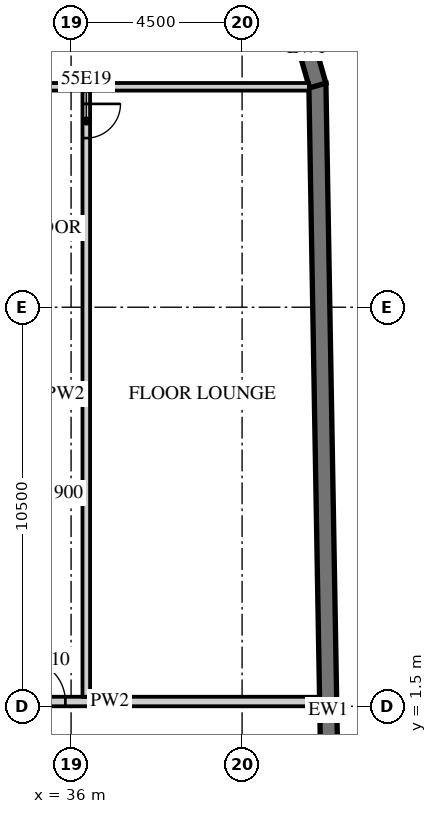
"""IFC4 building model, lengths in metres.
Left out: names, types, materials, properties, quantities, classifications, styles, units other than length and angle.
Written with IfcOpenShell. Run it as: python <this file> out.ifc"""

import sys

from ifc_helpers import new_model, si_unit, direction, frame, frame_2d, origin, place, context, subcontext, project, spatial, polyline, rectangle, outline, extrude, element, fill, save


model = new_model("IFC4")
c1 = context("Model", 3, precision=1e-05, world=origin(), true_north=direction((0.0, 1.0)))
c2 = subcontext(c1, "Body", "Model", "MODEL_VIEW")
j1 = project(units=[si_unit("LENGTHUNIT", "METRE"), si_unit("PLANEANGLEUNIT", "RADIAN")], contexts=[c1])
p1 = place(None, origin())
s1 = spatial("IfcSite", under=j1, at=p1, CompositionType="ELEMENT")
p2 = place(p1, origin())
s2 = spatial("IfcBuilding", under=s1, at=p2, CompositionType="ELEMENT")
p3 = place(p2, frame((0.0, 0.0, 227.6)))
s3 = spatial("IfcBuildingStorey", under=s2, at=p3, CompositionType="ELEMENT", Elevation=227.6)
p4 = place(p3, frame((43.057, -15.103, 0.0), z_axis=(0.0, 0.0, 1.0), x_axis=(-0.017452408953, 0.999847695112, 0.0)))
e1 = element("IfcWall", 1, at=p4, inside=s3, PredefinedType="SOLIDWALL", context=c2, shape_type="SweptSolid", body=[
    extrude(rectangle(XDim=33.0, YDim=0.45, at=frame_2d((16.5, 0.0))), origin(), (0.0, 0.0, 1.0), 3.02),
])
p5 = place(p3, frame((42.49, 17.833, 0.0), z_axis=(0.0, 0.0, 1.0), x_axis=(-0.275546368831, 0.961287781377, 0.0)))
e2 = element("IfcWall", 2, at=p5, inside=s3, PredefinedType="SOLIDWALL", context=c2, shape_type="SweptSolid", body=[
    extrude(outline(polyline([(0.0, -0.225), (2.071, -0.225), (1.95, 0.225), (0.121, 0.225), (0.0, -0.225)])), origin(), (0.0, 0.0, 1.0), 3.02),
])
p6 = place(p3, frame((31.5, 1.625, 0.0), z_axis=(0.0, 0.0, 1.0), x_axis=(1.0, 0.0, 0.0)))
e3 = element("IfcWall", 3, at=p6, inside=s3, PredefinedType="PARTITIONING", context=c2, shape_type="SweptSolid", body=[
    extrude(rectangle(XDim=11.04, YDim=0.25, at=frame_2d((5.52, 0.0))), origin(), (0.0, 0.0, 1.0), 3.02),
])
p7 = place(p6, frame((0.625, 0.0, 0.0)))
e4 = element("IfcOpeningElement", 4, at=p7, cuts=e3, PredefinedType="OPENING", context=c2, shape_type="SweptSolid", body=[
    extrude(rectangle(XDim=1.3, YDim=2.1, at=frame_2d((0.65, 1.05))), frame((0.0, 0.135, 0.0), z_axis=(0.0, -1.0, 0.0), x_axis=(1.0, 0.0, 0.0)), (0.0, 0.0, 1.0), 0.27),
])
p8 = place(p6, frame((3.25, 0.0, 0.0)))
e5 = element("IfcOpeningElement", 5, at=p8, cuts=e3, PredefinedType="OPENING", context=c2, shape_type="SweptSolid", body=[
    extrude(rectangle(XDim=1.1, YDim=2.1, at=frame_2d((0.55, 1.05))), frame((0.0, 0.135, 0.0), z_axis=(0.0, -1.0, 0.0), x_axis=(1.0, 0.0, 0.0)), (0.0, 0.0, 1.0), 0.27),
])
p9 = place(p3, frame((36.4, 1.75, 0.0), z_axis=(0.0, 0.0, 1.0), x_axis=(0.0, 1.0, 0.0)))
e6 = element("IfcWall", 6, at=p9, inside=s3, PredefinedType="PARTITIONING", context=c2, shape_type="SweptSolid", body=[
    extrude(rectangle(XDim=15.95, YDim=0.2, at=frame_2d((7.975, 0.0))), origin(), (0.0, 0.0, 1.0), 3.02),
])
p10 = place(p9, frame((14.7, 0.0, 0.0)))
e7 = element("IfcOpeningElement", 7, at=p10, cuts=e6, PredefinedType="OPENING", context=c2, shape_type="SweptSolid", body=[
    extrude(rectangle(XDim=0.9, YDim=2.1, at=frame_2d((0.45, 1.05))), frame((0.0, 0.11, 0.0), z_axis=(0.0, -1.0, 0.0), x_axis=(1.0, 0.0, 0.0)), (0.0, 0.0, 1.0), 0.22),
])
p11 = place(p3, frame((13.6, 17.8, 0.0), z_axis=(0.0, 0.0, 1.0), x_axis=(1.0, 0.0, 0.0)))
e8 = element("IfcWall", 8, at=p11, inside=s3, PredefinedType="PARTITIONING", context=c2, shape_type="SweptSolid", body=[
    extrude(rectangle(XDim=28.657, YDim=0.2, at=frame_2d((14.329, 0.0))), origin(), (0.0, 0.0, 1.0), 3.02),
])
p12 = place(p11, frame((15.012, 0.0, 0.0)))
e9 = element("IfcOpeningElement", 9, at=p12, cuts=e8, PredefinedType="OPENING", context=c2, shape_type="SweptSolid", body=[
    extrude(rectangle(XDim=0.9, YDim=2.1, at=frame_2d((0.45, 1.05))), frame((0.0, 0.11, 0.0), z_axis=(0.0, -1.0, 0.0), x_axis=(1.0, 0.0, 0.0)), (0.0, 0.0, 1.0), 0.22),
])
p13 = place(p11, frame((6.712, 0.0, 0.0)))
e10 = element("IfcOpeningElement", 10, at=p13, cuts=e8, PredefinedType="OPENING", context=c2, shape_type="SweptSolid", body=[
    extrude(rectangle(XDim=0.9, YDim=2.1, at=frame_2d((0.45, 1.05))), frame((0.0, 0.11, 0.0), z_axis=(0.0, -1.0, 0.0), x_axis=(1.0, 0.0, 0.0)), (0.0, 0.0, 1.0), 0.22),
])
p14 = place(p8, origin())
e11 = element("IfcDoor", 11, at=p14, inside=s3, OperationType="SINGLE_SWING_LEFT", PredefinedType="DOOR", context=c2, shape_type="SweptSolid", body=[
    extrude(rectangle(XDim=1.1, YDim=2.1, at=frame_2d((0.55, 1.05))), frame((0.0, 0.025, 0.0), z_axis=(0.0, -1.0, 0.0), x_axis=(1.0, 0.0, 0.0)), (0.0, 0.0, 1.0), 0.05),
])
fill(e5, e11)
p15 = place(p10, origin())
e12 = element("IfcDoor", 12, at=p15, inside=s3, OperationType="SINGLE_SWING_RIGHT", PredefinedType="DOOR", context=c2, shape_type="SweptSolid", body=[
    extrude(rectangle(XDim=0.9, YDim=2.1, at=frame_2d((0.45, 1.05))), frame((0.0, 0.025, 0.0), z_axis=(0.0, -1.0, 0.0), x_axis=(1.0, 0.0, 0.0)), (0.0, 0.0, 1.0), 0.05),
])
fill(e7, e12)
save(model, sys.argv[1])
